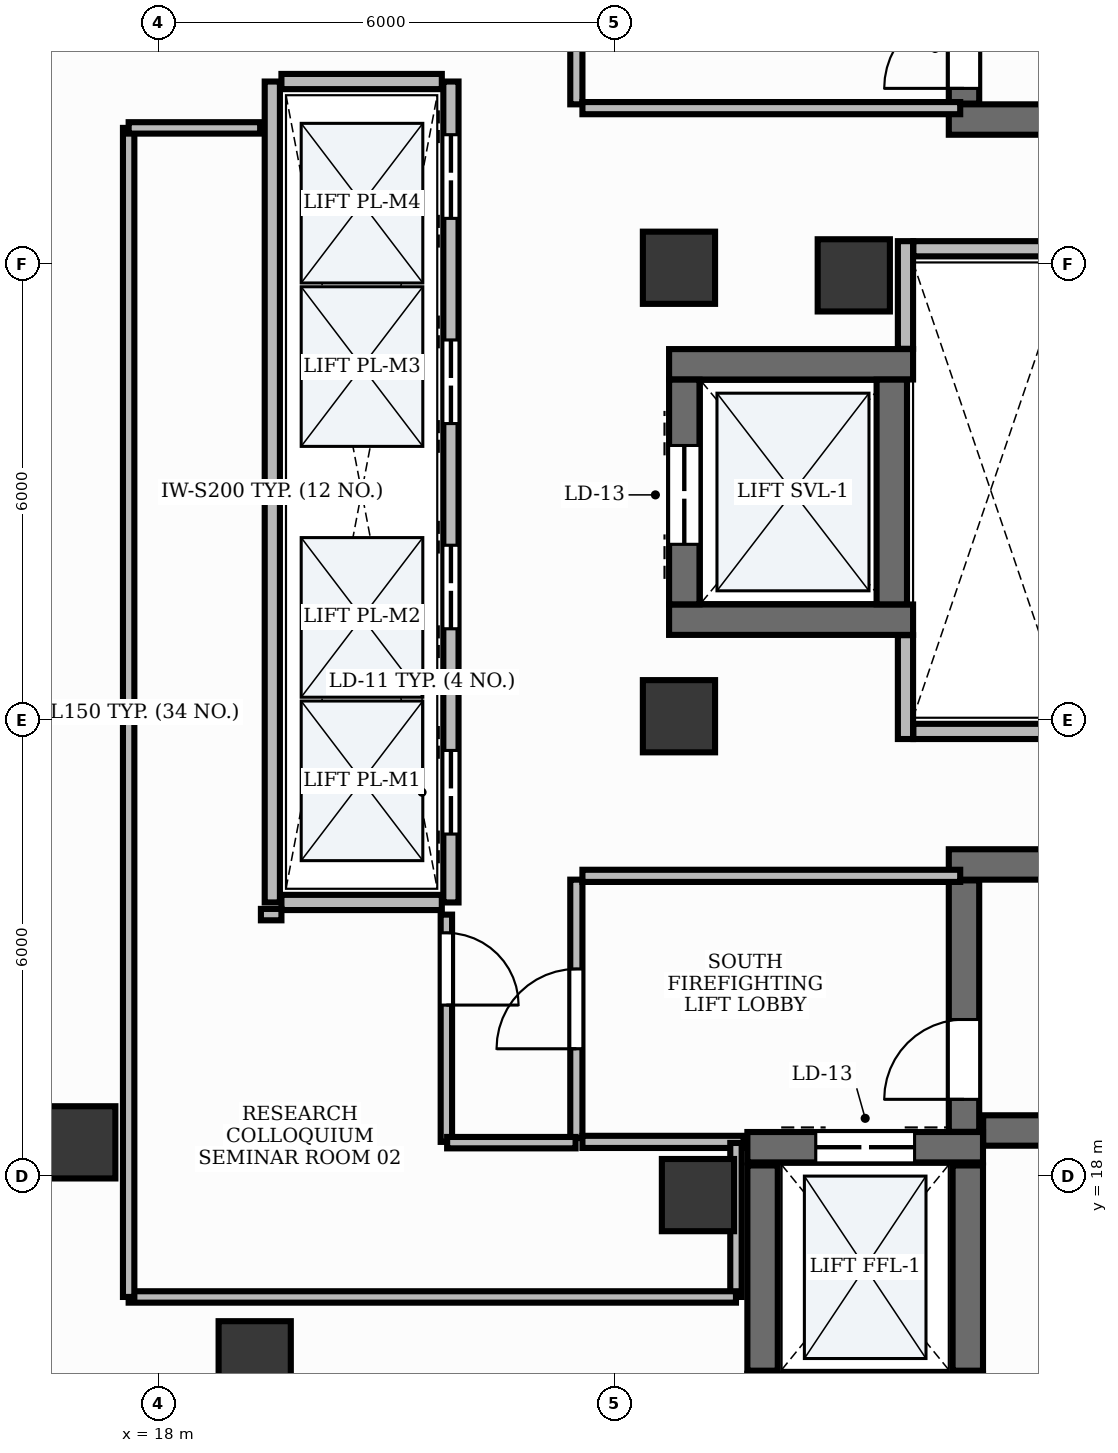
"""IFC4 building model, lengths in metres.
Left out: names, types, materials, properties, quantities, classifications, styles, units other than length and angle.
Written with IfcOpenShell. Run it as: python <this file> out.ifc"""

import sys

from ifc_helpers import new_model, si_unit, direction, frame, frame_2d, origin, origin_2d, place, context, subcontext, project, spatial, rectangle, extrude, element, fill, save


model = new_model("IFC4")
c1 = context("Model", 3, precision=1e-05, world=origin(), true_north=direction((0.0, 1.0)))
c2 = subcontext(c1, "Body", "Model", "MODEL_VIEW")
j1 = project(units=[si_unit("LENGTHUNIT", "METRE"), si_unit("PLANEANGLEUNIT", "RADIAN")], contexts=[c1])
p1 = place(None, origin())
s1 = spatial("IfcSite", under=j1, at=p1, CompositionType="ELEMENT")
p2 = place(p1, origin())
s2 = spatial("IfcBuilding", under=s1, at=p2, CompositionType="ELEMENT")
p3 = place(p2, frame((0.0, 0.0, 222.6)))
s3 = spatial("IfcBuildingStorey", under=s2, at=p3, CompositionType="ELEMENT", Elevation=222.6)
p4 = place(p3, frame((28.4, 31.9, 0.0), z_axis=(0.0, 0.0, 1.0), x_axis=(1.0, 0.0, 0.0)))
e1 = element("IfcWall", 1, at=p4, inside=s3, PredefinedType="SHEAR", context=c2, shape_type="SweptSolid", body=[
    extrude(rectangle(XDim=8.65, YDim=0.4, at=frame_2d((4.325, 0.0))), origin(), (0.0, 0.0, 1.0), 3.9),
])
p5 = place(p3, frame((28.6, 32.11, 0.0), z_axis=(0.0, 0.0, 1.0), x_axis=(0.0, 1.0, 0.0)))
e2 = element("IfcWall", 2, at=p5, inside=s3, PredefinedType="SHEAR", context=c2, shape_type="SweptSolid", body=[
    extrude(rectangle(XDim=3.308, YDim=0.4, at=frame_2d((1.654, 0.0))), origin(), (0.0, 0.0, 1.0), 3.9),
])
p6 = place(p5, frame((0.2, 0.0, 0.0)))
e3 = element("IfcOpeningElement", 3, at=p6, cuts=e2, PredefinedType="OPENING", context=c2, shape_type="SweptSolid", body=[
    extrude(rectangle(XDim=1.05, YDim=2.15, at=frame_2d((0.525, 1.075))), frame((0.0, 0.215, 0.0), z_axis=(0.0, -1.0, 0.0), x_axis=(1.0, 0.0, 0.0)), (0.0, 0.0, 1.0), 0.43),
])
p7 = place(p3, frame((28.852, 18.6, 0.0), z_axis=(0.0, 0.0, 1.0), x_axis=(1.0, 0.0, 0.0)))
e4 = element("IfcWall", 4, at=p7, inside=s3, PredefinedType="SHEAR", context=c2, shape_type="SweptSolid", body=[
    extrude(rectangle(XDim=8.198, YDim=0.4, at=frame_2d((4.099, 0.0))), origin(), (0.0, 0.0, 1.0), 3.9),
])
p8 = place(p3, frame((28.4, 22.1, 0.0), z_axis=(0.0, 0.0, 1.0), x_axis=(1.0, 0.0, 0.0)))
e5 = element("IfcWall", 5, at=p8, inside=s3, PredefinedType="SHEAR", context=c2, shape_type="SweptSolid", body=[
    extrude(rectangle(XDim=8.65, YDim=0.4, at=frame_2d((4.325, 0.0))), origin(), (0.0, 0.0, 1.0), 3.9),
])
p9 = place(p3, frame((28.6, 18.582, 0.0), z_axis=(0.0, 0.0, 1.0), x_axis=(0.0, 1.0, 0.0)))
e6 = element("IfcWall", 6, at=p9, inside=s3, PredefinedType="SHEAR", context=c2, shape_type="SweptSolid", body=[
    extrude(rectangle(XDim=3.308, YDim=0.4, at=frame_2d((1.654, 0.0))), origin(), (0.0, 0.0, 1.0), 3.9),
])
p10 = place(p9, frame((0.428, 0.0, 0.0)))
e7 = element("IfcOpeningElement", 7, at=p10, cuts=e6, PredefinedType="OPENING", context=c2, shape_type="SweptSolid", body=[
    extrude(rectangle(XDim=1.05, YDim=2.15, at=frame_2d((0.525, 1.075))), frame((0.0, 0.215, 0.0), z_axis=(0.0, -1.0, 0.0), x_axis=(1.0, 0.0, 0.0)), (0.0, 0.0, 1.0), 0.43),
])
p11 = place(p3, frame((25.75, 18.38, 0.0), z_axis=(0.0, 0.0, 1.0), x_axis=(1.0, 0.0, 0.0)))
e8 = element("IfcWall", 8, at=p11, inside=s3, PredefinedType="SHEAR", context=c2, shape_type="SweptSolid", body=[
    extrude(rectangle(XDim=3.1, YDim=0.4, at=frame_2d((1.55, 0.0))), origin(), (0.0, 0.0, 1.0), 3.9),
])
p12 = place(p11, frame((0.9, 0.0, 0.0)))
e9 = element("IfcOpeningElement", 9, at=p12, cuts=e8, PredefinedType="OPENING", context=c2, shape_type="SweptSolid", body=[
    extrude(rectangle(XDim=1.3, YDim=2.2, at=frame_2d((0.65, 1.1))), frame((0.0, 0.215, 0.0), z_axis=(0.0, -1.0, 0.0), x_axis=(1.0, 0.0, 0.0)), (0.0, 0.0, 1.0), 0.43),
])
for number, where, z_axis, x_axis in (
    (10, (25.95, 15.44, 0.0), (0.0, 0.0, 1.0), (0.0, 1.0, 0.0)),
    (11, (28.65, 15.44, 0.0), (0.0, 0.0, 1.0), (0.0, 1.0, 0.0)),
):
    element("IfcWall", number, at=place(p3, frame(where, z_axis=z_axis, x_axis=x_axis)), inside=s3, PredefinedType="SHEAR", context=c2, shape_type="SweptSolid", body=[
        extrude(rectangle(XDim=2.7, YDim=0.4, at=frame_2d((1.35, 0.0))), origin(), (0.0, 0.0, 1.0), 3.9),
    ])
for number, where, z_axis, x_axis in (
    (12, (24.72, 28.68, 0.0), (0.0, 0.0, 1.0), (1.0, 0.0, 0.0)),
    (13, (24.72, 25.32, 0.0), (0.0, 0.0, 1.0), (1.0, 0.0, 0.0)),
):
    element("IfcWall", number, at=place(p3, frame(where, z_axis=z_axis, x_axis=x_axis)), inside=s3, PredefinedType="SHEAR", context=c2, shape_type="SweptSolid", body=[
        extrude(rectangle(XDim=3.21, YDim=0.4, at=frame_2d((1.605, 0.0))), origin(), (0.0, 0.0, 1.0), 3.9),
    ])
p13 = place(p3, frame((24.92, 25.522, 0.0), z_axis=(0.0, 0.0, 1.0), x_axis=(0.0, 1.0, 0.0)))
e14 = element("IfcWall", 14, at=p13, inside=s3, PredefinedType="SHEAR", context=c2, shape_type="SweptSolid", body=[
    extrude(rectangle(XDim=2.956, YDim=0.4, at=frame_2d((1.478, 0.0))), origin(), (0.0, 0.0, 1.0), 3.9),
])
p14 = place(p13, frame((0.79, 0.0, 0.0)))
e15 = element("IfcOpeningElement", 15, at=p14, cuts=e14, PredefinedType="OPENING", context=c2, shape_type="SweptSolid", body=[
    extrude(rectangle(XDim=1.3, YDim=2.2, at=frame_2d((0.65, 1.1))), frame((0.0, 0.215, 0.0), z_axis=(0.0, -1.0, 0.0), x_axis=(1.0, 0.0, 0.0)), (0.0, 0.0, 1.0), 0.43),
])
p15 = place(p3, frame((27.65, 25.522, 0.0), z_axis=(0.0, 0.0, 1.0), x_axis=(0.0, 1.0, 0.0)))
e16 = element("IfcWall", 16, at=p15, inside=s3, PredefinedType="SHEAR", context=c2, shape_type="SweptSolid", body=[
    extrude(rectangle(XDim=2.956, YDim=0.4, at=frame_2d((1.478, 0.0))), origin(), (0.0, 0.0, 1.0), 3.9),
])
for number, where, z_axis, x_axis in (
    (17, (24.85, 29.95, -0.0), (0.0, 0.0, 1.0), (1.0, 0.0, 0.0)),
    (18, (27.15, 29.85, -0.0), (0.0, 0.0, 1.0), (1.0, 0.0, 0.0)),
    (19, (24.85, 24.05, -0.0), (0.0, 0.0, 1.0), (1.0, 0.0, 0.0)),
    (20, (25.1, 17.75, -0.0), (0.0, 0.0, 1.0), (1.0, 0.0, 0.0)),
):
    element("IfcColumn", number, at=place(p3, frame(where, z_axis=z_axis, x_axis=x_axis)), inside=s3, PredefinedType="PILASTER", context=c2, shape_type="SweptSolid", body=[
        extrude(rectangle(XDim=0.95, YDim=0.95, at=origin_2d()), origin(), (0.0, 0.0, 1.0), 3.901),
    ])
for number, where, z_axis, x_axis in (
    (21, (16.96, 18.444, -0.0), (0.0, 0.0, 1.0), (1.0, 0.0, 0.0)),
    (22, (19.268, 15.616, -0.0), (0.0, 0.0, 1.0), (1.0, 0.0, 0.0)),
):
    element("IfcColumn", number, at=place(p3, frame(where, z_axis=z_axis, x_axis=x_axis)), inside=s3, PredefinedType="COLUMN", context=c2, shape_type="SweptSolid", body=[
        extrude(rectangle(XDim=0.95, YDim=0.95, at=origin_2d()), origin(), (0.0, 0.0, 1.0), 3.901),
    ])
p16 = place(p3, frame((19.5, 21.6, 0.0), z_axis=(0.0, 0.0, 1.0), x_axis=(0.0, 1.0, 0.0)))
e23 = element("IfcWall", 23, at=p16, inside=s3, PredefinedType="PARTITIONING", context=c2, shape_type="SweptSolid", body=[
    extrude(rectangle(XDim=10.8, YDim=0.2, at=frame_2d((5.4, 0.0))), origin(), (0.0, 0.0, 1.0), 2.91),
])
p17 = place(p3, frame((21.85, 21.6, 0.0), z_axis=(0.0, 0.0, 1.0), x_axis=(0.0, 1.0, 0.0)))
e24 = element("IfcWall", 24, at=p17, inside=s3, PredefinedType="PARTITIONING", context=c2, shape_type="SweptSolid", body=[
    extrude(rectangle(XDim=10.8, YDim=0.2, at=frame_2d((5.4, 0.0))), origin(), (0.0, 0.0, 1.0), 2.91),
])
p18 = place(p17, frame((0.9, 0.0, 0.0)))
e25 = element("IfcOpeningElement", 25, at=p18, cuts=e24, PredefinedType="OPENING", context=c2, shape_type="SweptSolid", body=[
    extrude(rectangle(XDim=1.1, YDim=2.2, at=frame_2d((0.55, 1.1))), frame((0.0, 0.115, 0.0), z_axis=(0.0, -1.0, 0.0), x_axis=(1.0, 0.0, 0.0)), (0.0, 0.0, 1.0), 0.23),
])
p19 = place(p17, frame((3.6, 0.0, 0.0)))
e26 = element("IfcOpeningElement", 26, at=p19, cuts=e24, PredefinedType="OPENING", context=c2, shape_type="SweptSolid", body=[
    extrude(rectangle(XDim=1.1, YDim=2.2, at=frame_2d((0.55, 1.1))), frame((0.0, 0.115, 0.0), z_axis=(0.0, -1.0, 0.0), x_axis=(1.0, 0.0, 0.0)), (0.0, 0.0, 1.0), 0.23),
])
p20 = place(p17, frame((6.3, 0.0, 0.0)))
e27 = element("IfcOpeningElement", 27, at=p20, cuts=e24, PredefinedType="OPENING", context=c2, shape_type="SweptSolid", body=[
    extrude(rectangle(XDim=1.1, YDim=2.2, at=frame_2d((0.55, 1.1))), frame((0.0, 0.115, 0.0), z_axis=(0.0, -1.0, 0.0), x_axis=(1.0, 0.0, 0.0)), (0.0, 0.0, 1.0), 0.23),
])
p21 = place(p17, frame((9.0, 0.0, 0.0)))
e28 = element("IfcOpeningElement", 28, at=p21, cuts=e24, PredefinedType="OPENING", context=c2, shape_type="SweptSolid", body=[
    extrude(rectangle(XDim=1.1, YDim=2.2, at=frame_2d((0.55, 1.1))), frame((0.0, 0.115, 0.0), z_axis=(0.0, -1.0, 0.0), x_axis=(1.0, 0.0, 0.0)), (0.0, 0.0, 1.0), 0.23),
])
for number, where, z_axis, x_axis in (
    (29, (19.62, 21.6, 0.0), (0.0, 0.0, 1.0), (1.0, 0.0, 0.0)),
    (30, (19.62, 32.4, 0.0), (0.0, 0.0, 1.0), (1.0, 0.0, 0.0)),
):
    element("IfcWall", number, at=place(p3, frame(where, z_axis=z_axis, x_axis=x_axis)), inside=s3, PredefinedType="PARTITIONING", context=c2, shape_type="SweptSolid", body=[
        extrude(rectangle(XDim=2.11, YDim=0.2, at=frame_2d((1.055, 0.0))), origin(), (0.0, 0.0, 1.0), 2.91),
    ])
p22 = place(p3, frame((27.83, 23.75, 0.0), z_axis=(0.0, 0.0, 1.0), x_axis=(0.0, 1.0, 0.0)))
e31 = element("IfcWall", 31, at=p22, inside=s3, PredefinedType="PARTITIONING", context=c2, shape_type="SweptSolid", body=[
    extrude(rectangle(XDim=1.366, YDim=0.2, at=frame_2d((0.683, 0.0))), origin(), (0.0, 0.0, 1.0), 2.91),
])
p23 = place(p3, frame((27.83, 28.884, 0.0), z_axis=(0.0, 0.0, 1.0), x_axis=(0.0, 1.0, 0.0)))
e32 = element("IfcWall", 32, at=p23, inside=s3, PredefinedType="PARTITIONING", context=c2, shape_type="SweptSolid", body=[
    extrude(rectangle(XDim=1.416, YDim=0.2, at=frame_2d((0.708, 0.0))), origin(), (0.0, 0.0, 1.0), 2.91),
])
for number, where, z_axis, x_axis in (
    (33, (27.934, 23.85, 0.0), (0.0, 0.0, 1.0), (1.0, 0.0, 0.0)),
    (34, (27.934, 30.2, 0.0), (0.0, 0.0, 1.0), (1.0, 0.0, 0.0)),
):
    element("IfcWall", number, at=place(p3, frame(where, z_axis=z_axis, x_axis=x_axis)), inside=s3, PredefinedType="PARTITIONING", context=c2, shape_type="SweptSolid", body=[
        extrude(rectangle(XDim=2.096, YDim=0.2, at=frame_2d((1.048, 0.0))), origin(), (0.0, 0.0, 1.0), 2.91),
    ])
p24 = place(p3, frame((23.5, 32.1, 0.0), z_axis=(0.0, 0.0, 1.0), x_axis=(0.0, 1.0, 0.0)))
e35 = element("IfcWall", 35, at=p24, inside=s3, PredefinedType="PARTITIONING", context=c2, shape_type="SweptSolid", body=[
    extrude(rectangle(XDim=3.4, YDim=0.16, at=frame_2d((1.7, 0.0))), origin(), (0.0, 0.0, 1.0), 2.91),
])
p25 = place(p24, frame((1.175, 0.0, 0.0)))
e36 = element("IfcOpeningElement", 36, at=p25, cuts=e35, PredefinedType="OPENING", context=c2, shape_type="SweptSolid", body=[
    extrude(rectangle(XDim=1.05, YDim=2.15, at=frame_2d((0.525, 1.075))), frame((0.0, 0.095, 0.0), z_axis=(0.0, -1.0, 0.0), x_axis=(1.0, 0.0, 0.0)), (0.0, 0.0, 1.0), 0.19),
])
p26 = place(p3, frame((23.5, 18.5, 0.0), z_axis=(0.0, 0.0, 1.0), x_axis=(0.0, 1.0, 0.0)))
e37 = element("IfcWall", 37, at=p26, inside=s3, PredefinedType="PARTITIONING", context=c2, shape_type="SweptSolid", body=[
    extrude(rectangle(XDim=3.4, YDim=0.16, at=frame_2d((1.7, 0.0))), origin(), (0.0, 0.0, 1.0), 2.91),
])
p27 = place(p26, frame((1.175, 0.0, 0.0)))
e38 = element("IfcOpeningElement", 38, at=p27, cuts=e37, PredefinedType="OPENING", context=c2, shape_type="SweptSolid", body=[
    extrude(rectangle(XDim=1.05, YDim=2.15, at=frame_2d((0.525, 1.075))), frame((0.0, 0.095, 0.0), z_axis=(0.0, -1.0, 0.0), x_axis=(1.0, 0.0, 0.0)), (0.0, 0.0, 1.0), 0.19),
])
for number, where, z_axis, x_axis in (
    (39, (23.58, 32.05, 0.0), (0.0, 0.0, 1.0), (1.0, 0.0, 0.0)),
    (40, (23.58, 21.95, 0.0), (0.0, 0.0, 1.0), (1.0, 0.0, 0.0)),
):
    element("IfcWall", number, at=place(p3, frame(where, z_axis=z_axis, x_axis=x_axis)), inside=s3, PredefinedType="PARTITIONING", context=c2, shape_type="SweptSolid", body=[
        extrude(rectangle(XDim=4.97, YDim=0.16, at=frame_2d((2.485, 0.0))), origin(), (0.0, 0.0, 1.0), 2.91),
    ])
p28 = place(p3, frame((23.58, 18.45, 0.0), z_axis=(0.0, 0.0, 1.0), x_axis=(1.0, 0.0, 0.0)))
e41 = element("IfcWall", 41, at=p28, inside=s3, PredefinedType="PARTITIONING", context=c2, shape_type="SweptSolid", body=[
    extrude(rectangle(XDim=2.12, YDim=0.16, at=frame_2d((1.06, 0.0))), origin(), (0.0, 0.0, 1.0), 2.91),
])
p29 = place(p3, frame((21.79, 21.44, 0.0), z_axis=(0.0, 0.0, 1.0), x_axis=(0.0, -1.0, 0.0)))
e42 = element("IfcWall", 42, at=p29, inside=s3, PredefinedType="PARTITIONING", context=c2, shape_type="SweptSolid", body=[
    extrude(rectangle(XDim=2.99, YDim=0.15, at=frame_2d((1.495, 0.0))), origin(), (0.0, 0.0, 1.0), 2.91),
])
p30 = place(p29, frame((0.24, 0.0, 0.0)))
e43 = element("IfcOpeningElement", 43, at=p30, cuts=e42, PredefinedType="OPENING", context=c2, shape_type="SweptSolid", body=[
    extrude(rectangle(XDim=0.95, YDim=2.15, at=frame_2d((0.475, 1.075))), frame((0.0, 0.09, 0.0), z_axis=(0.0, -1.0, 0.0), x_axis=(1.0, 0.0, 0.0)), (0.0, 0.0, 1.0), 0.18),
])
p31 = place(p3, frame((19.35, 21.44, 0.0), z_axis=(0.0, 0.0, 1.0), x_axis=(1.0, 0.0, 0.0)))
e44 = element("IfcWall", 44, at=p31, inside=s3, PredefinedType="PARTITIONING", context=c2, shape_type="SweptSolid", body=[
    extrude(rectangle(XDim=0.27, YDim=0.15, at=frame_2d((0.135, 0.0))), origin(), (0.0, 0.0, 1.0), 2.91),
])
p32 = place(p3, frame((21.8, 18.44, 0.0), z_axis=(0.0, 0.0, 1.0), x_axis=(1.0, 0.0, 0.0)))
e45 = element("IfcWall", 45, at=p32, inside=s3, PredefinedType="PARTITIONING", context=c2, shape_type="SweptSolid", body=[
    extrude(rectangle(XDim=1.69, YDim=0.15, at=frame_2d((0.845, 0.0))), origin(), (0.0, 0.0, 1.0), 2.91),
])
p33 = place(p3, frame((25.6, 18.436, 0.0), z_axis=(0.0, 0.0, 1.0), x_axis=(0.0, -1.0, 0.0)))
e46 = element("IfcWall", 46, at=p33, inside=s3, PredefinedType="PARTITIONING", context=c2, shape_type="SweptSolid", body=[
    extrude(rectangle(XDim=2.026, YDim=0.15, at=frame_2d((1.013, 0.0))), origin(), (0.0, 0.0, 1.0), 2.91),
])
p34 = place(p3, frame((25.6, 16.41, 0.0), z_axis=(0.0, 0.0, 1.0), x_axis=(-1.0, 0.0, 0.0)))
e47 = element("IfcWall", 47, at=p34, inside=s3, PredefinedType="PARTITIONING", context=c2, shape_type="SweptSolid", body=[
    extrude(rectangle(XDim=7.99, YDim=0.15, at=frame_2d((3.995, 0.0))), origin(), (0.0, 0.0, 1.0), 2.91),
])
p35 = place(p3, frame((17.61, 16.41, 0.0), z_axis=(0.0, 0.0, 1.0), x_axis=(0.0, 1.0, 0.0)))
e48 = element("IfcWall", 48, at=p35, inside=s3, PredefinedType="PARTITIONING", context=c2, shape_type="SweptSolid", body=[
    extrude(rectangle(XDim=15.38, YDim=0.15, at=frame_2d((7.69, 0.0))), origin(), (0.0, 0.0, 1.0), 2.91),
])
p36 = place(p3, frame((17.61, 31.79, 0.0), z_axis=(0.0, 0.0, 1.0), x_axis=(1.0, 0.0, 0.0)))
e49 = element("IfcWall", 49, at=p36, inside=s3, PredefinedType="PARTITIONING", context=c2, shape_type="SweptSolid", body=[
    extrude(rectangle(XDim=1.73, YDim=0.15, at=frame_2d((0.865, 0.0))), origin(), (0.0, 0.0, 1.0), 2.91),
])
p37 = place(p6, origin())
e50 = element("IfcDoor", 50, at=p37, inside=s3, OperationType="SINGLE_SWING_LEFT", PredefinedType="DOOR", context=c2, shape_type="SweptSolid", body=[
    extrude(rectangle(XDim=1.05, YDim=2.15, at=frame_2d((0.525, 1.075))), frame((0.0, 0.025, 0.0), z_axis=(0.0, -1.0, 0.0), x_axis=(1.0, 0.0, 0.0)), (0.0, 0.0, 1.0), 0.05),
])
fill(e3, e50)
p38 = place(p10, origin())
e51 = element("IfcDoor", 51, at=p38, inside=s3, OperationType="SINGLE_SWING_LEFT", PredefinedType="DOOR", context=c2, shape_type="SweptSolid", body=[
    extrude(rectangle(XDim=1.05, YDim=2.15, at=frame_2d((0.525, 1.075))), frame((0.0, 0.025, 0.0), z_axis=(0.0, -1.0, 0.0), x_axis=(1.0, 0.0, 0.0)), (0.0, 0.0, 1.0), 0.05),
])
fill(e7, e51)
p39 = place(p18, origin())
e52 = element("IfcDoor", 52, at=p39, inside=s3, OperationType="DOUBLE_DOOR_SLIDING", PredefinedType="DOOR", context=c2, shape_type="SweptSolid", body=[
    extrude(rectangle(XDim=1.1, YDim=2.2, at=frame_2d((0.55, 1.1))), frame((0.0, 0.025, 0.0), z_axis=(0.0, -1.0, 0.0), x_axis=(1.0, 0.0, 0.0)), (0.0, 0.0, 1.0), 0.05),
])
fill(e25, e52)
p40 = place(p19, origin())
e53 = element("IfcDoor", 53, at=p40, inside=s3, OperationType="DOUBLE_DOOR_SLIDING", PredefinedType="DOOR", context=c2, shape_type="SweptSolid", body=[
    extrude(rectangle(XDim=1.1, YDim=2.2, at=frame_2d((0.55, 1.1))), frame((0.0, 0.025, 0.0), z_axis=(0.0, -1.0, 0.0), x_axis=(1.0, 0.0, 0.0)), (0.0, 0.0, 1.0), 0.05),
])
fill(e26, e53)
p41 = place(p20, origin())
e54 = element("IfcDoor", 54, at=p41, inside=s3, OperationType="DOUBLE_DOOR_SLIDING", PredefinedType="DOOR", context=c2, shape_type="SweptSolid", body=[
    extrude(rectangle(XDim=1.1, YDim=2.2, at=frame_2d((0.55, 1.1))), frame((0.0, 0.025, 0.0), z_axis=(0.0, -1.0, 0.0), x_axis=(1.0, 0.0, 0.0)), (0.0, 0.0, 1.0), 0.05),
])
fill(e27, e54)
p42 = place(p21, origin())
e55 = element("IfcDoor", 55, at=p42, inside=s3, OperationType="DOUBLE_DOOR_SLIDING", PredefinedType="DOOR", context=c2, shape_type="SweptSolid", body=[
    extrude(rectangle(XDim=1.1, YDim=2.2, at=frame_2d((0.55, 1.1))), frame((0.0, 0.025, 0.0), z_axis=(0.0, -1.0, 0.0), x_axis=(1.0, 0.0, 0.0)), (0.0, 0.0, 1.0), 0.05),
])
fill(e28, e55)
p43 = place(p12, origin())
e56 = element("IfcDoor", 56, at=p43, inside=s3, OperationType="DOUBLE_DOOR_SLIDING", PredefinedType="DOOR", context=c2, shape_type="SweptSolid", body=[
    extrude(rectangle(XDim=1.3, YDim=2.2, at=frame_2d((0.65, 1.1))), frame((0.0, 0.025, 0.0), z_axis=(0.0, -1.0, 0.0), x_axis=(1.0, 0.0, 0.0)), (0.0, 0.0, 1.0), 0.05),
])
fill(e9, e56)
p44 = place(p14, origin())
e57 = element("IfcDoor", 57, at=p44, inside=s3, OperationType="DOUBLE_DOOR_SLIDING", PredefinedType="DOOR", context=c2, shape_type="SweptSolid", body=[
    extrude(rectangle(XDim=1.3, YDim=2.2, at=frame_2d((0.65, 1.1))), frame((0.0, 0.025, 0.0), z_axis=(0.0, -1.0, 0.0), x_axis=(1.0, 0.0, 0.0)), (0.0, 0.0, 1.0), 0.05),
])
fill(e15, e57)
p45 = place(p27, origin())
e58 = element("IfcDoor", 58, at=p45, inside=s3, OperationType="SINGLE_SWING_LEFT", PredefinedType="DOOR", context=c2, shape_type="SweptSolid", body=[
    extrude(rectangle(XDim=1.05, YDim=2.15, at=frame_2d((0.525, 1.075))), frame((0.0, 0.025, 0.0), z_axis=(0.0, -1.0, 0.0), x_axis=(1.0, 0.0, 0.0)), (0.0, 0.0, 1.0), 0.05),
])
fill(e38, e58)
p46 = place(p30, origin())
e59 = element("IfcDoor", 59, at=p46, inside=s3, OperationType="SINGLE_SWING_RIGHT", PredefinedType="DOOR", context=c2, shape_type="SweptSolid", body=[
    extrude(rectangle(XDim=0.95, YDim=2.15, at=frame_2d((0.475, 1.075))), frame((0.0, 0.025, 0.0), z_axis=(0.0, -1.0, 0.0), x_axis=(1.0, 0.0, 0.0)), (0.0, 0.0, 1.0), 0.05),
])
fill(e43, e59)
save(model, sys.argv[1])
